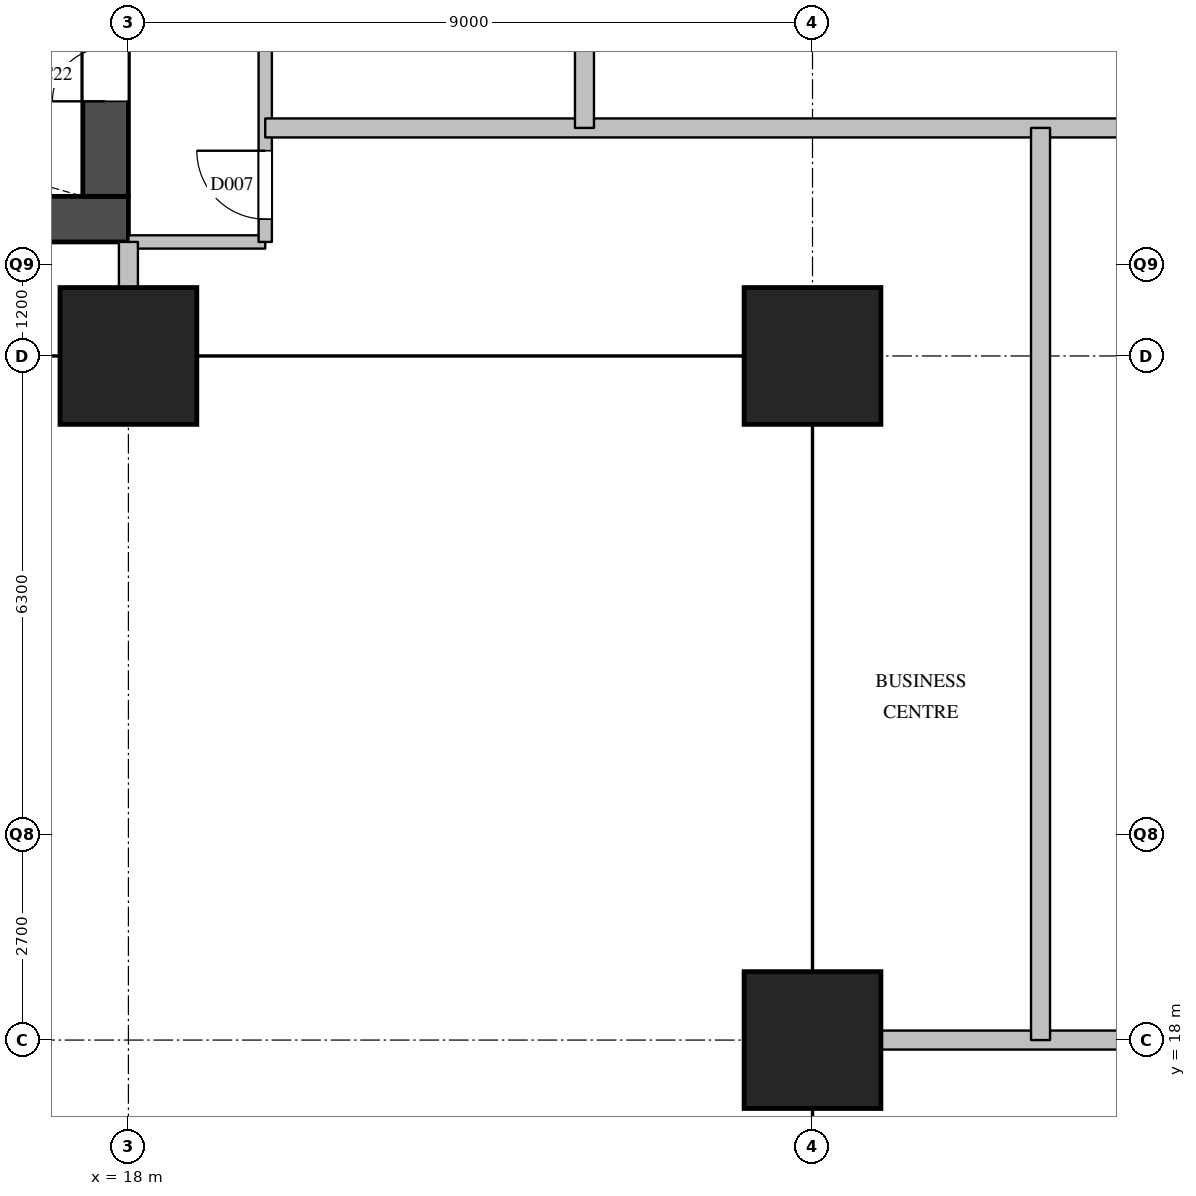
"""IFC4 building model, lengths in metres.
Left out: names, types, materials, properties, quantities, classifications, styles, units other than length and angle.
Written with IfcOpenShell. Run it as: python <this file> out.ifc"""

import sys

from ifc_helpers import new_model, si_unit, direction, frame, frame_2d, origin, origin_2d, place, context, subcontext, project, spatial, rectangle, extrude, element, fill, save


model = new_model("IFC4")
c1 = context("Model", 3, precision=1e-05, world=origin(), true_north=direction((0.0, 1.0)))
c2 = subcontext(c1, "Body", "Model", "MODEL_VIEW")
j1 = project(units=[si_unit("LENGTHUNIT", "METRE"), si_unit("PLANEANGLEUNIT", "RADIAN")], contexts=[c1])
p1 = place(None, origin())
s1 = spatial("IfcSite", under=j1, at=p1, CompositionType="ELEMENT")
p2 = place(p1, origin())
s2 = spatial("IfcBuilding", under=s1, at=p2, CompositionType="ELEMENT")
p3 = place(p2, frame((0.0, 0.0, 115.8)))
s3 = spatial("IfcBuildingStorey", under=s2, at=p3, CompositionType="ELEMENT", Elevation=115.8)
for number, where, z_axis, x_axis in (
    (1, (18.0, 27.0, 0.0), (0.0, 0.0, 1.0), (1.0, 0.0, 0.0)),
    (2, (27.0, 18.0, 0.0), (0.0, 0.0, 1.0), (1.0, 0.0, 0.0)),
    (3, (27.0, 27.0, 0.0), (0.0, 0.0, 1.0), (1.0, 0.0, 0.0)),
):
    element("IfcColumn", number, at=place(p3, frame(where, z_axis=z_axis, x_axis=x_axis)), inside=s3, PredefinedType="COLUMN", context=c2, shape_type="SweptSolid", body=[
        extrude(rectangle(XDim=1.8, YDim=1.8, at=origin_2d()), origin(), (0.0, 0.0, 1.0), 3.8),
    ])
p4 = place(p3, frame((5.6, 28.8, 0.0), z_axis=(0.0, 0.0, 1.0), x_axis=(1.0, 0.0, 0.0)))
e4 = element("IfcWall", 4, at=p4, inside=s3, PredefinedType="SHEAR", context=c2, shape_type="SweptSolid", body=[
    extrude(rectangle(XDim=12.4, YDim=0.6, at=frame_2d((6.2, 0.0))), origin(), (0.0, 0.0, 1.0), 3.5),
])
p5 = place(p4, frame((1.05, 0.0, 0.0)))
e5 = element("IfcOpeningElement", 5, at=p5, cuts=e4, PredefinedType="OPENING", context=c2, shape_type="SweptSolid", body=[
    extrude(rectangle(XDim=1.2, YDim=2.1, at=frame_2d((0.6, 1.05))), frame((0.0, 0.31, 0.0), z_axis=(0.0, -1.0, 0.0), x_axis=(1.0, 0.0, 0.0)), (0.0, 0.0, 1.0), 0.62),
])
p6 = place(p4, frame((5.25, 0.0, 0.0)))
e6 = element("IfcOpeningElement", 6, at=p6, cuts=e4, PredefinedType="OPENING", context=c2, shape_type="SweptSolid", body=[
    extrude(rectangle(XDim=1.2, YDim=2.1, at=frame_2d((0.6, 1.05))), frame((0.0, 0.31, 0.0), z_axis=(0.0, -1.0, 0.0), x_axis=(1.0, 0.0, 0.0)), (0.0, 0.0, 1.0), 0.62),
])
p7 = place(p4, frame((7.35, 0.0, 0.0)))
e7 = element("IfcOpeningElement", 7, at=p7, cuts=e4, PredefinedType="OPENING", context=c2, shape_type="SweptSolid", body=[
    extrude(rectangle(XDim=1.2, YDim=2.1, at=frame_2d((0.6, 1.05))), frame((0.0, 0.31, 0.0), z_axis=(0.0, -1.0, 0.0), x_axis=(1.0, 0.0, 0.0)), (0.0, 0.0, 1.0), 0.62),
])
p8 = place(p3, frame((17.7, 29.1, 0.0), z_axis=(0.0, 0.0, 1.0), x_axis=(0.0, 1.0, 0.0)))
e8 = element("IfcWall", 8, at=p8, inside=s3, PredefinedType="SHEAR", context=c2, shape_type="SweptSolid", body=[
    extrude(rectangle(XDim=20.3, YDim=0.6, at=frame_2d((10.15, 0.0))), origin(), (0.0, 0.0, 1.0), 3.5),
])
p9 = place(p8, frame((1.25, 0.0, 0.0)))
e9 = element("IfcOpeningElement", 9, at=p9, cuts=e8, PredefinedType="OPENING", context=c2, shape_type="SweptSolid", body=[
    extrude(rectangle(XDim=0.7, YDim=2.1, at=frame_2d((0.35, 1.05))), frame((0.0, 0.31, 0.0), z_axis=(0.0, -1.0, 0.0), x_axis=(1.0, 0.0, 0.0)), (0.0, 0.0, 1.0), 0.62),
])
p10 = place(p8, frame((7.05, 0.0, 0.0)))
e10 = element("IfcOpeningElement", 10, at=p10, cuts=e8, PredefinedType="OPENING", context=c2, shape_type="SweptSolid", body=[
    extrude(rectangle(XDim=0.7, YDim=2.1, at=frame_2d((0.35, 1.05))), frame((0.0, 0.31, 0.0), z_axis=(0.0, -1.0, 0.0), x_axis=(1.0, 0.0, 0.0)), (0.0, 0.0, 1.0), 0.62),
])
p11 = place(p3, frame((18.0, 28.5, 0.0), z_axis=(0.0, 0.0, 1.0), x_axis=(1.0, 0.0, 0.0)))
e11 = element("IfcWall", 11, at=p11, inside=s3, PredefinedType="PARTITIONING", context=c2, shape_type="SweptSolid", body=[
    extrude(rectangle(XDim=1.8, YDim=0.175, at=frame_2d((0.9, 0.0))), origin(), (0.0, 0.0, 1.0), 3.5),
])
p12 = place(p3, frame((19.8, 28.5, 0.0), z_axis=(0.0, 0.0, 1.0), x_axis=(0.0, 1.0, 0.0)))
e12 = element("IfcWall", 12, at=p12, inside=s3, PredefinedType="PARTITIONING", context=c2, shape_type="SweptSolid", body=[
    extrude(rectangle(XDim=23.3, YDim=0.175, at=frame_2d((11.65, 0.0))), origin(), (0.0, 0.0, 1.0), 3.5),
])
p13 = place(p12, frame((0.3, 0.0, 0.0)))
e13 = element("IfcOpeningElement", 13, at=p13, cuts=e12, PredefinedType="OPENING", context=c2, shape_type="SweptSolid", body=[
    extrude(rectangle(XDim=0.9, YDim=2.1, at=frame_2d((0.45, 1.05))), frame((0.0, 0.097, 0.0), z_axis=(0.0, -1.0, 0.0), x_axis=(1.0, 0.0, 0.0)), (0.0, 0.0, 1.0), 0.195),
])
p14 = place(p12, frame((4.0, 0.0, 0.0)))
e14 = element("IfcOpeningElement", 14, at=p14, cuts=e12, PredefinedType="OPENING", context=c2, shape_type="SweptSolid", body=[
    extrude(rectangle(XDim=1.0, YDim=2.1, at=frame_2d((0.5, 1.05))), frame((0.0, 0.097, 0.0), z_axis=(0.0, -1.0, 0.0), x_axis=(1.0, 0.0, 0.0)), (0.0, 0.0, 1.0), 0.195),
])
p15 = place(p12, frame((10.0, 0.0, 0.0)))
e15 = element("IfcOpeningElement", 15, at=p15, cuts=e12, PredefinedType="OPENING", context=c2, shape_type="SweptSolid", body=[
    extrude(rectangle(XDim=1.0, YDim=2.1, at=frame_2d((0.5, 1.05))), frame((0.0, 0.097, 0.0), z_axis=(0.0, -1.0, 0.0), x_axis=(1.0, 0.0, 0.0)), (0.0, 0.0, 1.0), 0.195),
])
p16 = place(p12, frame((17.95, 0.0, 0.0)))
e16 = element("IfcOpeningElement", 16, at=p16, cuts=e12, PredefinedType="OPENING", context=c2, shape_type="SweptSolid", body=[
    extrude(rectangle(XDim=0.9, YDim=2.1, at=frame_2d((0.45, 1.05))), frame((0.0, 0.097, 0.0), z_axis=(0.0, -1.0, 0.0), x_axis=(1.0, 0.0, 0.0)), (0.0, 0.0, 1.0), 0.195),
])
p17 = place(p3, frame((27.0, 18.0, 0.0), z_axis=(0.0, 0.0, 1.0), x_axis=(1.0, 0.0, 0.0)))
e17 = element("IfcWall", 17, at=p17, inside=s3, PredefinedType="PARTITIONING", context=c2, shape_type="SweptSolid", body=[
    extrude(rectangle(XDim=7.2, YDim=0.25, at=frame_2d((3.6, 0.0))), origin(), (0.0, 0.0, 1.0), 3.5),
])
p18 = place(p3, frame((19.8, 30.0, 0.0), z_axis=(0.0, 0.0, 1.0), x_axis=(1.0, 0.0, 0.0)))
e18 = element("IfcWall", 18, at=p18, inside=s3, PredefinedType="PARTITIONING", context=c2, shape_type="SweptSolid", body=[
    extrude(rectangle(XDim=14.4, YDim=0.25, at=frame_2d((7.2, 0.0))), origin(), (0.0, 0.0, 1.0), 2.5),
])
p19 = place(p3, frame((18.0, 27.0, 0.0), z_axis=(0.0, 0.0, 1.0), x_axis=(0.0, 1.0, 0.0)))
e19 = element("IfcWall", 19, at=p19, inside=s3, PredefinedType="PARTITIONING", context=c2, shape_type="SweptSolid", body=[
    extrude(rectangle(XDim=1.5, YDim=0.25, at=frame_2d((0.75, 0.0))), origin(), (0.0, 0.0, 1.0), 3.5),
])
p20 = place(p3, frame((24.0, 30.0, 0.0), z_axis=(0.0, 0.0, 1.0), x_axis=(0.0, 1.0, 0.0)))
e20 = element("IfcWall", 20, at=p20, inside=s3, PredefinedType="PARTITIONING", context=c2, shape_type="SweptSolid", body=[
    extrude(rectangle(XDim=24.0, YDim=0.25, at=frame_2d((12.0, 0.0))), origin(), (0.0, 0.0, 1.0), 2.5),
])
p21 = place(p3, frame((30.0, 18.0, 0.0), z_axis=(0.0, 0.0, 1.0), x_axis=(0.0, 1.0, 0.0)))
e21 = element("IfcWall", 21, at=p21, inside=s3, PredefinedType="PARTITIONING", context=c2, shape_type="SweptSolid", body=[
    extrude(rectangle(XDim=12.0, YDim=0.25, at=frame_2d((6.0, 0.0))), origin(), (0.0, 0.0, 1.0), 2.5),
])
p22 = place(p9, origin())
e22 = element("IfcDoor", 22, at=p22, inside=s3, OperationType="SINGLE_SWING_LEFT", PredefinedType="DOOR", context=c2, shape_type="SweptSolid", body=[
    extrude(rectangle(XDim=0.7, YDim=2.1, at=frame_2d((0.35, 1.05))), frame((0.0, 0.025, 0.0), z_axis=(0.0, -1.0, 0.0), x_axis=(1.0, 0.0, 0.0)), (0.0, 0.0, 1.0), 0.05),
])
fill(e9, e22)
p23 = place(p13, origin())
e23 = element("IfcDoor", 23, at=p23, inside=s3, OperationType="SINGLE_SWING_RIGHT", PredefinedType="DOOR", context=c2, shape_type="SweptSolid", body=[
    extrude(rectangle(XDim=0.9, YDim=2.1, at=frame_2d((0.45, 1.05))), frame((0.0, 0.025, 0.0), z_axis=(0.0, -1.0, 0.0), x_axis=(1.0, 0.0, 0.0)), (0.0, 0.0, 1.0), 0.05),
])
fill(e13, e23)
save(model, sys.argv[1])
